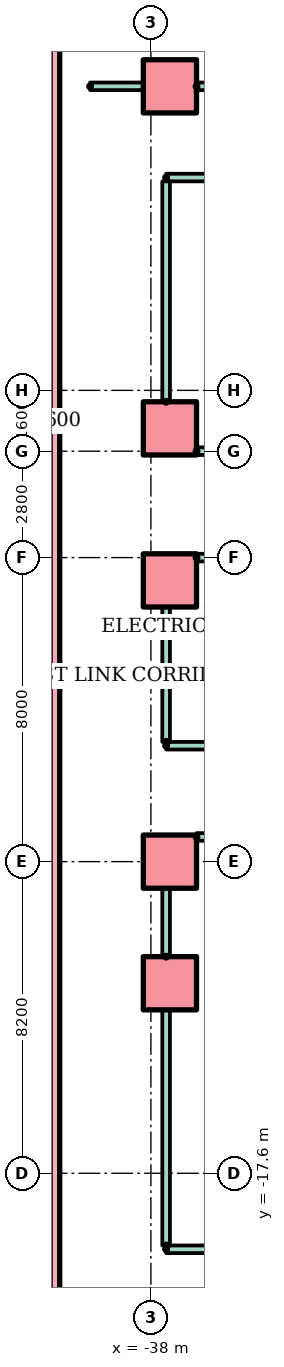
"""IFC4 building model, lengths in metres.
Left out: names, types, materials, properties, quantities, classifications, styles, units other than length and angle.
Written with IfcOpenShell. Run it as: python <this file> out.ifc"""

import sys

from ifc_helpers import new_model, si_unit, direction, frame, frame_2d, origin, origin_2d, place, context, subcontext, project, spatial, rectangle, hollow_rectangle, extrude, element, save


model = new_model("IFC4")
c1 = context("Model", 3, precision=1e-05, world=origin(), true_north=direction((0.0, 1.0)))
c2 = subcontext(c1, "Body", "Model", "MODEL_VIEW")
j1 = project(units=[si_unit("LENGTHUNIT", "METRE"), si_unit("PLANEANGLEUNIT", "RADIAN")], contexts=[c1])
p1 = place(None, origin())
s1 = spatial("IfcSite", under=j1, at=p1, CompositionType="ELEMENT")
p2 = place(p1, origin())
s2 = spatial("IfcBuilding", under=s1, at=p2, CompositionType="ELEMENT")
p3 = place(p2, frame((0.0, 0.0, -10.0)))
s3 = spatial("IfcBuildingStorey", under=s2, at=p3, CompositionType="ELEMENT", Elevation=-10.0)
p4 = place(p3, frame((-40.7, -50.4, -0.3), z_axis=(0.0, 0.0, 1.0), x_axis=(0.0, 1.0, 0.0)))
e1 = element("IfcWall", 1, at=p4, inside=s3, PredefinedType="SOLIDWALL", context=c2, shape_type="SweptSolid", body=[
    extrude(rectangle(XDim=70.8, YDim=0.6, at=frame_2d((35.4, 0.0))), origin(), (0.0, 0.0, 1.0), 4.95),
])
for number, where in (
    (2, (-37.5, -12.6, -0.3)),
    (3, (-37.5, -9.4, -0.3)),
    (4, (-37.5, -2.0, -0.3)),
    (5, (-37.5, 2.0, -0.3)),
    (6, (-37.5, 11.0, -0.3)),
):
    element("IfcColumn", number, at=place(p3, frame(where)), inside=s3, PredefinedType="COLUMN", context=c2, shape_type="SweptSolid", body=[
        extrude(hollow_rectangle(XDim=1.4, YDim=1.4, WallThickness=0.08, at=origin_2d()), origin(), (0.0, 0.0, 1.0), 5.3),
    ])
p5 = place(p3, frame((-37.6, -19.6, 0.0)))
e7 = element("IfcWall", 7, at=p5, inside=s3, PredefinedType="PARTITIONING", context=c2, shape_type="SweptSolid", body=[
    extrude(rectangle(XDim=75.2, YDim=0.2, at=frame_2d((37.6, 0.0))), origin(), (0.0, 0.0, 1.0), 4.65),
])
p6 = place(p5, frame((9.3, 0.0, 0.0)))
e8 = element("IfcOpeningElement", 8, at=p6, cuts=e7, PredefinedType="OPENING", context=c2, shape_type="SweptSolid", body=[
    extrude(rectangle(XDim=1.4, YDim=2.1, at=frame_2d((0.7, 1.05))), frame((0.0, 0.11, 0.0), z_axis=(0.0, -1.0, 0.0), x_axis=(1.0, 0.0, 0.0)), (0.0, 0.0, 1.0), 0.22),
])
p7 = place(p5, frame((29.3, 0.0, 0.0)))
e9 = element("IfcOpeningElement", 9, at=p7, cuts=e7, PredefinedType="OPENING", context=c2, shape_type="SweptSolid", body=[
    extrude(rectangle(XDim=1.4, YDim=2.1, at=frame_2d((0.7, 1.05))), frame((0.0, 0.11, 0.0), z_axis=(0.0, -1.0, 0.0), x_axis=(1.0, 0.0, 0.0)), (0.0, 0.0, 1.0), 0.22),
])
p8 = place(p5, frame((46.5, 0.0, 0.0)))
e10 = element("IfcOpeningElement", 10, at=p8, cuts=e7, PredefinedType="OPENING", context=c2, shape_type="SweptSolid", body=[
    extrude(rectangle(XDim=1.0, YDim=2.1, at=frame_2d((0.5, 1.05))), frame((0.0, 0.11, 0.0), z_axis=(0.0, -1.0, 0.0), x_axis=(1.0, 0.0, 0.0)), (0.0, 0.0, 1.0), 0.22),
])
p9 = place(p5, frame((64.15, 0.0, 0.0)))
e11 = element("IfcOpeningElement", 11, at=p9, cuts=e7, PredefinedType="OPENING", context=c2, shape_type="SweptSolid", body=[
    extrude(rectangle(XDim=0.9, YDim=2.1, at=frame_2d((0.45, 1.05))), frame((0.0, 0.11, 0.0), z_axis=(0.0, -1.0, 0.0), x_axis=(1.0, 0.0, 0.0)), (0.0, 0.0, 1.0), 0.22),
])
p10 = place(p3, frame((-36.8, -8.75, 0.0)))
e12 = element("IfcWall", 12, at=p10, inside=s3, PredefinedType="PARTITIONING", context=c2, shape_type="SweptSolid", body=[
    extrude(rectangle(XDim=73.6, YDim=0.2, at=frame_2d((36.8, 0.0))), origin(), (0.0, 0.0, 1.0), 4.65),
])
p11 = place(p3, frame((-37.6, -6.35, 0.0)))
e13 = element("IfcWall", 13, at=p11, inside=s3, PredefinedType="PARTITIONING", context=c2, shape_type="SweptSolid", body=[
    extrude(rectangle(XDim=75.2, YDim=0.2, at=frame_2d((37.6, 0.0))), origin(), (0.0, 0.0, 1.0), 4.65),
])
p12 = place(p11, frame((6.5, 0.0, 0.0)))
e14 = element("IfcOpeningElement", 14, at=p12, cuts=e13, PredefinedType="OPENING", context=c2, shape_type="SweptSolid", body=[
    extrude(rectangle(XDim=1.0, YDim=2.1, at=frame_2d((0.5, 1.05))), frame((0.0, 0.11, 0.0), z_axis=(0.0, -1.0, 0.0), x_axis=(1.0, 0.0, 0.0)), (0.0, 0.0, 1.0), 0.22),
])
p13 = place(p11, frame((20.5, 0.0, 0.0)))
e15 = element("IfcOpeningElement", 15, at=p13, cuts=e13, PredefinedType="OPENING", context=c2, shape_type="SweptSolid", body=[
    extrude(rectangle(XDim=1.0, YDim=2.1, at=frame_2d((0.5, 1.05))), frame((0.0, 0.11, 0.0), z_axis=(0.0, -1.0, 0.0), x_axis=(1.0, 0.0, 0.0)), (0.0, 0.0, 1.0), 0.22),
])
p14 = place(p11, frame((34.55, 0.0, 0.0)))
e16 = element("IfcOpeningElement", 16, at=p14, cuts=e13, PredefinedType="OPENING", context=c2, shape_type="SweptSolid", body=[
    extrude(rectangle(XDim=0.9, YDim=2.1, at=frame_2d((0.45, 1.05))), frame((0.0, 0.11, 0.0), z_axis=(0.0, -1.0, 0.0), x_axis=(1.0, 0.0, 0.0)), (0.0, 0.0, 1.0), 0.22),
])
p15 = place(p11, frame((58.1, 0.0, 0.0)))
e17 = element("IfcOpeningElement", 17, at=p15, cuts=e13, PredefinedType="OPENING", context=c2, shape_type="SweptSolid", body=[
    extrude(rectangle(XDim=1.0, YDim=2.1, at=frame_2d((0.5, 1.05))), frame((0.0, 0.11, 0.0), z_axis=(0.0, -1.0, 0.0), x_axis=(1.0, 0.0, 0.0)), (0.0, 0.0, 1.0), 0.22),
])
p16 = place(p3, frame((-36.8, -1.4, 0.0)))
e18 = element("IfcWall", 18, at=p16, inside=s3, PredefinedType="PARTITIONING", context=c2, shape_type="SweptSolid", body=[
    extrude(rectangle(XDim=6.25, YDim=0.2, at=frame_2d((3.125, 0.0))), origin(), (0.0, 0.0, 1.0), 4.65),
])
p17 = place(p3, frame((-36.8, 1.4, 0.0)))
e19 = element("IfcWall", 19, at=p17, inside=s3, PredefinedType="PARTITIONING", context=c2, shape_type="SweptSolid", body=[
    extrude(rectangle(XDim=6.25, YDim=0.2, at=frame_2d((3.125, 0.0))), origin(), (0.0, 0.0, 1.0), 4.65),
])
p18 = place(p17, frame((3.5, 0.0, 0.0)))
e20 = element("IfcOpeningElement", 20, at=p18, cuts=e19, PredefinedType="OPENING", context=c2, shape_type="SweptSolid", body=[
    extrude(rectangle(XDim=1.4, YDim=2.1, at=frame_2d((0.7, 1.05))), frame((0.0, 0.11, 0.0), z_axis=(0.0, -1.0, 0.0), x_axis=(1.0, 0.0, 0.0)), (0.0, 0.0, 1.0), 0.22),
])
p19 = place(p3, frame((-37.6, 8.6, 0.0)))
e21 = element("IfcWall", 21, at=p19, inside=s3, PredefinedType="PARTITIONING", context=c2, shape_type="SweptSolid", body=[
    extrude(rectangle(XDim=21.3, YDim=0.2, at=frame_2d((10.65, 0.0))), origin(), (0.0, 0.0, 1.0), 4.65),
])
p20 = place(p3, frame((-39.6, 11.0, 0.0)))
e22 = element("IfcWall", 22, at=p20, inside=s3, PredefinedType="PARTITIONING", context=c2, shape_type="SweptSolid", body=[
    extrude(rectangle(XDim=1.4, YDim=0.2, at=frame_2d((0.7, 0.0))), origin(), (0.0, 0.0, 1.0), 4.65),
])
p21 = place(p3, frame((-36.8, 11.0, 0.0)))
e23 = element("IfcWall", 23, at=p21, inside=s3, PredefinedType="PARTITIONING", context=c2, shape_type="SweptSolid", body=[
    extrude(rectangle(XDim=6.25, YDim=0.2, at=frame_2d((3.125, 0.0))), origin(), (0.0, 0.0, 1.0), 4.65),
])
p22 = place(p21, frame((3.8, 0.0, 0.0)))
e24 = element("IfcOpeningElement", 24, at=p22, cuts=e23, PredefinedType="OPENING", context=c2, shape_type="SweptSolid", body=[
    extrude(rectangle(XDim=1.4, YDim=2.1, at=frame_2d((0.7, 1.05))), frame((0.0, 0.11, 0.0), z_axis=(0.0, -1.0, 0.0), x_axis=(1.0, 0.0, 0.0)), (0.0, 0.0, 1.0), 0.22),
])
p23 = place(p3, frame((-37.6, -19.5, 0.0), z_axis=(0.0, 0.0, 1.0), x_axis=(0.0, 1.0, 0.0)))
e25 = element("IfcWall", 25, at=p23, inside=s3, PredefinedType="PARTITIONING", context=c2, shape_type="SweptSolid", body=[
    extrude(rectangle(XDim=6.2, YDim=0.2, at=frame_2d((3.1, 0.0))), origin(), (0.0, 0.0, 1.0), 4.65),
])
p24 = place(p3, frame((-37.6, -11.9, 0.0), z_axis=(0.0, 0.0, 1.0), x_axis=(0.0, 1.0, 0.0)))
e26 = element("IfcWall", 26, at=p24, inside=s3, PredefinedType="PARTITIONING", context=c2, shape_type="SweptSolid", body=[
    extrude(rectangle(XDim=1.8, YDim=0.2, at=frame_2d((0.9, 0.0))), origin(), (0.0, 0.0, 1.0), 4.65),
])
p25 = place(p3, frame((-37.6, -6.25, 0.0), z_axis=(0.0, 0.0, 1.0), x_axis=(0.0, 1.0, 0.0)))
e27 = element("IfcWall", 27, at=p25, inside=s3, PredefinedType="PARTITIONING", context=c2, shape_type="SweptSolid", body=[
    extrude(rectangle(XDim=3.55, YDim=0.2, at=frame_2d((1.775, 0.0))), origin(), (0.0, 0.0, 1.0), 4.65),
])
p26 = place(p3, frame((-37.6, 2.7, 0.0), z_axis=(0.0, 0.0, 1.0), x_axis=(0.0, 1.0, 0.0)))
e28 = element("IfcWall", 28, at=p26, inside=s3, PredefinedType="PARTITIONING", context=c2, shape_type="SweptSolid", body=[
    extrude(rectangle(XDim=5.8, YDim=0.2, at=frame_2d((2.9, 0.0))), origin(), (0.0, 0.0, 1.0), 4.65),
])
save(model, sys.argv[1])
